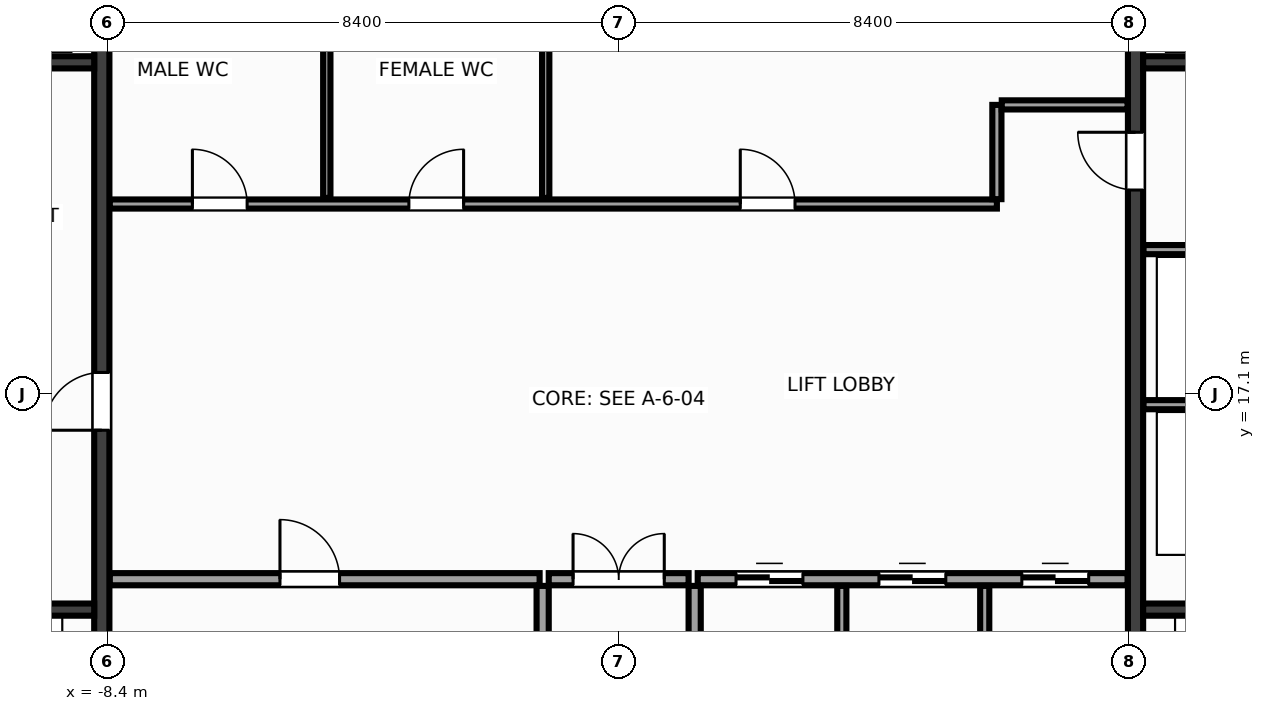
"""IFC4 building model, lengths in metres.
Left out: names, types, materials, properties, quantities, classifications, styles, units other than length and angle.
Written with IfcOpenShell. Run it as: python <this file> out.ifc"""

import sys

from ifc_helpers import new_model, si_unit, direction, frame, frame_2d, origin, place, context, subcontext, project, spatial, rectangle, extrude, source, transform, mapped, element, fill, save


model = new_model("IFC4")
c1 = context("Model", 3, precision=1e-05, world=origin(), true_north=direction((0.0, 1.0)))
c2 = subcontext(c1, "Body", "Model", "MODEL_VIEW")
j1 = project(units=[si_unit("LENGTHUNIT", "METRE"), si_unit("PLANEANGLEUNIT", "RADIAN")], contexts=[c1])
p1 = place(None, origin())
s1 = spatial("IfcSite", under=j1, at=p1, CompositionType="ELEMENT")
p2 = place(p1, origin())
s2 = spatial("IfcBuilding", under=s1, at=p2, CompositionType="ELEMENT")
p3 = place(p2, frame((0.0, 0.0, 102.8)))
s3 = spatial("IfcBuildingStorey", under=s2, at=p3, CompositionType="ELEMENT", Elevation=102.8)
m1 = source(origin(), c2, "Body", "SweptSolid", [
    extrude(rectangle(XDim=12.95, YDim=0.25, at=frame_2d((6.475, 0.0))), origin(), (0.0, 0.0, 1.0), 3.6),
])
p4 = place(p3, frame((-8.5, 10.525, 0.0), z_axis=(0.0, 0.0, 1.0), x_axis=(0.0, 1.0, 0.0)))
e1 = element("IfcWall", 1, at=p4, inside=s3, PredefinedType="SHEAR", context=c2, shape_type="MappedRepresentation", body=[
    mapped(m1, transform((0.0, 0.0, 0.0), x_axis=(1.0, 0.0, 0.0), y_axis=(0.0, 1.0, 0.0), z_axis=(0.0, 0.0, 1.0), scale=1.0)),
])
p5 = place(p4, frame((5.975, 0.0, 0.0)))
e2 = element("IfcOpeningElement", 2, at=p5, cuts=e1, PredefinedType="OPENING", context=c2, shape_type="SweptSolid", body=[
    extrude(rectangle(XDim=0.95, YDim=2.15, at=frame_2d((0.475, 1.075))), frame((0.0, 0.137, 0.0), z_axis=(0.0, -1.0, 0.0), x_axis=(1.0, 0.0, 0.0)), (0.0, 0.0, 1.0), 0.274),
])
p6 = place(p3, frame((8.5, 10.525, 0.0), z_axis=(0.0, 0.0, 1.0), x_axis=(0.0, 1.0, 0.0)))
e3 = element("IfcWall", 3, at=p6, inside=s3, PredefinedType="SHEAR", context=c2, shape_type="MappedRepresentation", body=[
    mapped(m1, transform((0.0, 0.0, 0.0), x_axis=(1.0, 0.0, 0.0), y_axis=(0.0, 1.0, 0.0), z_axis=(0.0, 0.0, 1.0), scale=1.0)),
])
p7 = place(p6, frame((9.925, 0.0, 0.0)))
e4 = element("IfcOpeningElement", 4, at=p7, cuts=e3, PredefinedType="OPENING", context=c2, shape_type="SweptSolid", body=[
    extrude(rectangle(XDim=0.95, YDim=2.15, at=frame_2d((0.475, 1.075))), frame((0.0, 0.137, 0.0), z_axis=(0.0, -1.0, 0.0), x_axis=(1.0, 0.0, 0.0)), (0.0, 0.0, 1.0), 0.274),
])
m2 = source(origin(), c2, "Body", "SweptSolid", [
    extrude(rectangle(XDim=2.825, YDim=0.2, at=frame_2d((1.413, 0.0))), origin(), (0.0, 0.0, 1.0), 3.6),
])
for number, where, z_axis, x_axis in (
    (5, (-11.45, 13.55, 0.0), (0.0, 0.0, 1.0), (1.0, 0.0, 0.0)),
    (6, (8.625, 13.55, 0.0), (0.0, 0.0, 1.0), (1.0, 0.0, 0.0)),
):
    element("IfcWall", number, at=place(p3, frame(where, z_axis=z_axis, x_axis=x_axis)), inside=s3, PredefinedType="SHEAR", context=c2, shape_type="MappedRepresentation", body=[
        mapped(m2, transform((0.0, 0.0, 0.0), x_axis=(1.0, 0.0, 0.0), y_axis=(0.0, 1.0, 0.0), z_axis=(0.0, 0.0, 1.0), scale=1.0)),
    ])
m3 = source(origin(), c2, "Body", "SweptSolid", [
    extrude(rectangle(XDim=3.02, YDim=0.2, at=frame_2d((1.51, 0.0))), origin(), (0.0, 0.0, 1.0), 3.6),
])
for number, where, z_axis, x_axis in (
    (7, (-11.645, 22.55, 0.0), (0.0, 0.0, 1.0), (1.0, 0.0, 0.0)),
    (8, (8.625, 22.55, 0.0), (0.0, 0.0, 1.0), (1.0, 0.0, 0.0)),
):
    element("IfcWall", number, at=place(p3, frame(where, z_axis=z_axis, x_axis=x_axis)), inside=s3, PredefinedType="SHEAR", context=c2, shape_type="MappedRepresentation", body=[
        mapped(m3, transform((0.0, 0.0, 0.0), x_axis=(1.0, 0.0, 0.0), y_axis=(0.0, 1.0, 0.0), z_axis=(0.0, 0.0, 1.0), scale=1.0)),
    ])
m4 = source(origin(), c2, "Body", "SweptSolid", [
    extrude(rectangle(XDim=3.01, YDim=0.15, at=frame_2d((1.505, 0.0))), origin(), (0.0, 0.0, 1.0), 3.36),
])
for number, where, z_axis, x_axis in (
    (9, (8.63, 16.92, 0.0), (0.0, 0.0, 1.0), (1.0, 0.0, 0.0)),
    (10, (8.63, 19.47, 0.0), (0.0, 0.0, 1.0), (1.0, 0.0, 0.0)),
):
    element("IfcWall", number, at=place(p3, frame(where, z_axis=z_axis, x_axis=x_axis)), inside=s3, PredefinedType="PARTITIONING", context=c2, shape_type="MappedRepresentation", body=[
        mapped(m4, transform((0.0, 0.0, 0.0), x_axis=(1.0, 0.0, 0.0), y_axis=(0.0, 1.0, 0.0), z_axis=(0.0, 0.0, 1.0), scale=1.0)),
    ])
m5 = source(origin(), c2, "Body", "SweptSolid", [
    extrude(rectangle(XDim=7.07, YDim=0.2, at=frame_2d((3.535, 0.0))), origin(), (0.0, 0.0, 1.0), 3.36),
])
p8 = place(p3, frame((-8.37, 14.05, 0.0), z_axis=(0.0, 0.0, 1.0), x_axis=(1.0, 0.0, 0.0)))
e11 = element("IfcWall", 11, at=p8, inside=s3, PredefinedType="PARTITIONING", context=c2, shape_type="MappedRepresentation", body=[
    mapped(m5, transform((0.0, 0.0, 0.0), x_axis=(1.0, 0.0, 0.0), y_axis=(0.0, 1.0, 0.0), z_axis=(0.0, 0.0, 1.0), scale=1.0)),
])
p9 = place(p8, frame((2.8, 0.0, 0.0)))
e12 = element("IfcOpeningElement", 12, at=p9, cuts=e11, PredefinedType="OPENING", context=c2, shape_type="SweptSolid", body=[
    extrude(rectangle(XDim=0.98, YDim=2.15, at=frame_2d((0.49, 1.075))), frame((0.0, 0.112, 0.0), z_axis=(0.0, -1.0, 0.0), x_axis=(1.0, 0.0, 0.0)), (0.0, 0.0, 1.0), 0.224),
])
p10 = place(p3, frame((1.3, 14.05, 0.0), z_axis=(0.0, 0.0, 1.0), x_axis=(1.0, 0.0, 0.0)))
e13 = element("IfcWall", 13, at=p10, inside=s3, PredefinedType="PARTITIONING", context=c2, shape_type="MappedRepresentation", body=[
    mapped(m5, transform((0.0, 0.0, 0.0), x_axis=(1.0, 0.0, 0.0), y_axis=(0.0, 1.0, 0.0), z_axis=(0.0, 0.0, 1.0), scale=1.0)),
])
p11 = place(p10, frame((0.63, 0.0, 0.0)))
e14 = element("IfcOpeningElement", 14, at=p11, cuts=e13, PredefinedType="OPENING", context=c2, shape_type="SweptSolid", body=[
    extrude(rectangle(XDim=1.1, YDim=2.15, at=frame_2d((0.55, 1.075))), frame((0.0, 0.112, 0.0), z_axis=(0.0, -1.0, 0.0), x_axis=(1.0, 0.0, 0.0)), (0.0, 0.0, 1.0), 0.224),
])
p12 = place(p10, frame((2.98, 0.0, 0.0)))
e15 = element("IfcOpeningElement", 15, at=p12, cuts=e13, PredefinedType="OPENING", context=c2, shape_type="SweptSolid", body=[
    extrude(rectangle(XDim=1.1, YDim=2.15, at=frame_2d((0.55, 1.075))), frame((0.0, 0.112, 0.0), z_axis=(0.0, -1.0, 0.0), x_axis=(1.0, 0.0, 0.0)), (0.0, 0.0, 1.0), 0.224),
])
p13 = place(p10, frame((5.33, 0.0, 0.0)))
e16 = element("IfcOpeningElement", 16, at=p13, cuts=e13, PredefinedType="OPENING", context=c2, shape_type="SweptSolid", body=[
    extrude(rectangle(XDim=1.1, YDim=2.15, at=frame_2d((0.55, 1.075))), frame((0.0, 0.112, 0.0), z_axis=(0.0, -1.0, 0.0), x_axis=(1.0, 0.0, 0.0)), (0.0, 0.0, 1.0), 0.224),
])
m6 = source(origin(), c2, "Body", "SweptSolid", [
    extrude(rectangle(XDim=3.415, YDim=0.2, at=frame_2d((1.708, 0.0))), origin(), (0.0, 0.0, 1.0), 3.36),
])
for number, where, z_axis, x_axis in (
    (17, (-1.25, 10.525, 0.0), (0.0, 0.0, 1.0), (0.0, 1.0, 0.0)),
    (18, (1.25, 10.525, 0.0), (0.0, 0.0, 1.0), (0.0, 1.0, 0.0)),
):
    element("IfcWall", number, at=place(p3, frame(where, z_axis=z_axis, x_axis=x_axis)), inside=s3, PredefinedType="PARTITIONING", context=c2, shape_type="MappedRepresentation", body=[
        mapped(m6, transform((0.0, 0.0, 0.0), x_axis=(1.0, 0.0, 0.0), y_axis=(0.0, 1.0, 0.0), z_axis=(0.0, 0.0, 1.0), scale=1.0)),
    ])
m7 = source(origin(), c2, "Body", "SweptSolid", [
    extrude(rectangle(XDim=2.3, YDim=0.2, at=frame_2d((1.15, 0.0))), origin(), (0.0, 0.0, 1.0), 3.36),
])
p14 = place(p3, frame((-1.15, 14.05, 0.0), z_axis=(0.0, 0.0, 1.0), x_axis=(1.0, 0.0, 0.0)))
e19 = element("IfcWall", 19, at=p14, inside=s3, PredefinedType="PARTITIONING", context=c2, shape_type="MappedRepresentation", body=[
    mapped(m7, transform((0.0, 0.0, 0.0), x_axis=(1.0, 0.0, 0.0), y_axis=(0.0, 1.0, 0.0), z_axis=(0.0, 0.0, 1.0), scale=1.0)),
])
p15 = place(p14, frame((0.4, 0.0, 0.0)))
e20 = element("IfcOpeningElement", 20, at=p15, cuts=e19, PredefinedType="OPENING", context=c2, shape_type="SweptSolid", body=[
    extrude(rectangle(XDim=1.5, YDim=2.2, at=frame_2d((0.75, 1.1))), frame((0.0, 0.112, 0.0), z_axis=(0.0, -1.0, 0.0), x_axis=(1.0, 0.0, 0.0)), (0.0, 0.0, 1.0), 0.224),
])
m8 = source(origin(), c2, "Body", "SweptSolid", [
    extrude(rectangle(XDim=14.59, YDim=0.15, at=frame_2d((7.295, 0.0))), origin(), (0.0, 0.0, 1.0), 3.36),
])
p16 = place(p3, frame((-8.37, 20.22, 0.0), z_axis=(0.0, 0.0, 1.0), x_axis=(1.0, 0.0, 0.0)))
e21 = element("IfcWall", 21, at=p16, inside=s3, PredefinedType="PARTITIONING", context=c2, shape_type="MappedRepresentation", body=[
    mapped(m8, transform((0.0, 0.0, 0.0), x_axis=(1.0, 0.0, 0.0), y_axis=(0.0, 1.0, 0.0), z_axis=(0.0, 0.0, 1.0), scale=1.0)),
])
p17 = place(p16, frame((1.36, 0.0, 0.0)))
e22 = element("IfcOpeningElement", 22, at=p17, cuts=e21, PredefinedType="OPENING", context=c2, shape_type="SweptSolid", body=[
    extrude(rectangle(XDim=0.9, YDim=2.15, at=frame_2d((0.45, 1.075))), frame((0.0, 0.087, 0.0), z_axis=(0.0, -1.0, 0.0), x_axis=(1.0, 0.0, 0.0)), (0.0, 0.0, 1.0), 0.174),
])
p18 = place(p16, frame((4.92, 0.0, 0.0)))
e23 = element("IfcOpeningElement", 23, at=p18, cuts=e21, PredefinedType="OPENING", context=c2, shape_type="SweptSolid", body=[
    extrude(rectangle(XDim=0.9, YDim=2.15, at=frame_2d((0.45, 1.075))), frame((0.0, 0.087, 0.0), z_axis=(0.0, -1.0, 0.0), x_axis=(1.0, 0.0, 0.0)), (0.0, 0.0, 1.0), 0.174),
])
p19 = place(p16, frame((10.37, 0.0, 0.0)))
e24 = element("IfcOpeningElement", 24, at=p19, cuts=e21, PredefinedType="OPENING", context=c2, shape_type="SweptSolid", body=[
    extrude(rectangle(XDim=0.9, YDim=2.15, at=frame_2d((0.45, 1.075))), frame((0.0, 0.087, 0.0), z_axis=(0.0, -1.0, 0.0), x_axis=(1.0, 0.0, 0.0)), (0.0, 0.0, 1.0), 0.174),
])
m9 = source(origin(), c2, "Body", "SweptSolid", [
    extrude(rectangle(XDim=1.55, YDim=0.15, at=frame_2d((0.775, 0.0))), origin(), (0.0, 0.0, 1.0), 3.36),
])
p20 = place(p3, frame((6.22, 20.3, 0.0), z_axis=(0.0, 0.0, 1.0), x_axis=(0.0, 1.0, 0.0)))
e25 = element("IfcWall", 25, at=p20, inside=s3, PredefinedType="PARTITIONING", context=c2, shape_type="MappedRepresentation", body=[
    mapped(m9, transform((0.0, 0.0, 0.0), x_axis=(1.0, 0.0, 0.0), y_axis=(0.0, 1.0, 0.0), z_axis=(0.0, 0.0, 1.0), scale=1.0)),
])
m10 = source(origin(), c2, "Body", "SweptSolid", [
    extrude(rectangle(XDim=2.07, YDim=0.15, at=frame_2d((1.035, 0.0))), origin(), (0.0, 0.0, 1.0), 3.36),
])
p21 = place(p3, frame((6.3, 21.85, 0.0), z_axis=(0.0, 0.0, 1.0), x_axis=(1.0, 0.0, 0.0)))
e26 = element("IfcWall", 26, at=p21, inside=s3, PredefinedType="PARTITIONING", context=c2, shape_type="MappedRepresentation", body=[
    mapped(m10, transform((0.0, 0.0, 0.0), x_axis=(1.0, 0.0, 0.0), y_axis=(0.0, 1.0, 0.0), z_axis=(0.0, 0.0, 1.0), scale=1.0)),
])
m11 = source(origin(), c2, "Body", "SweptSolid", [
    extrude(rectangle(XDim=3.415, YDim=0.15, at=frame_2d((1.708, 0.0))), origin(), (0.0, 0.0, 1.0), 3.36),
])
for number, where, z_axis, x_axis in (
    (27, (3.67, 10.525, 0.0), (0.0, 0.0, 1.0), (0.0, 1.0, 0.0)),
    (28, (6.02, 10.525, 0.0), (0.0, 0.0, 1.0), (0.0, 1.0, 0.0)),
):
    element("IfcWall", number, at=place(p3, frame(where, z_axis=z_axis, x_axis=x_axis)), inside=s3, PredefinedType="PARTITIONING", context=c2, shape_type="MappedRepresentation", body=[
        mapped(m11, transform((0.0, 0.0, 0.0), x_axis=(1.0, 0.0, 0.0), y_axis=(0.0, 1.0, 0.0), z_axis=(0.0, 0.0, 1.0), scale=1.0)),
    ])
m12 = source(origin(), c2, "Body", "SweptSolid", [
    extrude(rectangle(XDim=3.115, YDim=0.12, at=frame_2d((1.558, 0.0))), origin(), (0.0, 0.0, 1.0), 3.36),
])
for number, where, z_axis, x_axis in (
    (29, (-4.8, 20.32, 0.0), (0.0, 0.0, 1.0), (0.0, 1.0, 0.0)),
    (30, (-1.2, 20.32, 0.0), (0.0, 0.0, 1.0), (0.0, 1.0, 0.0)),
):
    element("IfcWall", number, at=place(p3, frame(where, z_axis=z_axis, x_axis=x_axis)), inside=s3, PredefinedType="PARTITIONING", context=c2, shape_type="MappedRepresentation", body=[
        mapped(m12, transform((0.0, 0.0, 0.0), x_axis=(1.0, 0.0, 0.0), y_axis=(0.0, 1.0, 0.0), z_axis=(0.0, 0.0, 1.0), scale=1.0)),
    ])
m13 = source(origin(), c2, "Body", "SweptSolid", [
    extrude(rectangle(XDim=0.95, YDim=2.15, at=frame_2d((0.475, 1.075))), frame((0.0, 0.025, 0.0), z_axis=(0.0, -1.0, 0.0), x_axis=(1.0, 0.0, 0.0)), (0.0, 0.0, 1.0), 0.05),
])
p22 = place(p5, origin())
e31 = element("IfcDoor", 31, at=p22, inside=s3, OperationType="SINGLE_SWING_LEFT", PredefinedType="DOOR", context=c2, shape_type="MappedRepresentation", body=[
    mapped(m13, transform((0.0, 0.0, 0.0), x_axis=(1.0, 0.0, 0.0), y_axis=(0.0, 1.0, 0.0), z_axis=(0.0, 0.0, 1.0), scale=1.0)),
])
fill(e2, e31)
m14 = source(origin(), c2, "Body", "SweptSolid", [
    extrude(rectangle(XDim=0.95, YDim=2.15, at=frame_2d((0.475, 1.075))), frame((0.0, 0.025, 0.0), z_axis=(0.0, -1.0, 0.0), x_axis=(1.0, 0.0, 0.0)), (0.0, 0.0, 1.0), 0.05),
])
p23 = place(p7, origin())
e32 = element("IfcDoor", 32, at=p23, inside=s3, OperationType="SINGLE_SWING_RIGHT", PredefinedType="DOOR", context=c2, shape_type="MappedRepresentation", body=[
    mapped(m14, transform((0.0, 0.0, 0.0), x_axis=(1.0, 0.0, 0.0), y_axis=(0.0, 1.0, 0.0), z_axis=(0.0, 0.0, 1.0), scale=1.0)),
])
fill(e4, e32)
m15 = source(origin(), c2, "Body", "SweptSolid", [
    extrude(rectangle(XDim=0.98, YDim=2.15, at=frame_2d((0.49, 1.075))), frame((0.0, 0.025, 0.0), z_axis=(0.0, -1.0, 0.0), x_axis=(1.0, 0.0, 0.0)), (0.0, 0.0, 1.0), 0.05),
])
p24 = place(p9, origin())
e33 = element("IfcDoor", 33, at=p24, inside=s3, OperationType="SINGLE_SWING_LEFT", PredefinedType="DOOR", context=c2, shape_type="MappedRepresentation", body=[
    mapped(m15, transform((0.0, 0.0, 0.0), x_axis=(1.0, 0.0, 0.0), y_axis=(0.0, 1.0, 0.0), z_axis=(0.0, 0.0, 1.0), scale=1.0)),
])
fill(e12, e33)
m16 = source(origin(), c2, "Body", "SweptSolid", [
    extrude(rectangle(XDim=1.1, YDim=2.15, at=frame_2d((0.55, 1.075))), frame((0.0, 0.025, 0.0), z_axis=(0.0, -1.0, 0.0), x_axis=(1.0, 0.0, 0.0)), (0.0, 0.0, 1.0), 0.05),
])
p25 = place(p11, origin())
e34 = element("IfcDoor", 34, at=p25, inside=s3, OperationType="DOUBLE_DOOR_SLIDING", PredefinedType="DOOR", context=c2, shape_type="MappedRepresentation", body=[
    mapped(m16, transform((0.0, 0.0, 0.0), x_axis=(1.0, 0.0, 0.0), y_axis=(0.0, 1.0, 0.0), z_axis=(0.0, 0.0, 1.0), scale=1.0)),
])
fill(e14, e34)
p26 = place(p12, origin())
e35 = element("IfcDoor", 35, at=p26, inside=s3, OperationType="DOUBLE_DOOR_SLIDING", PredefinedType="DOOR", context=c2, shape_type="MappedRepresentation", body=[
    mapped(m16, transform((0.0, 0.0, 0.0), x_axis=(1.0, 0.0, 0.0), y_axis=(0.0, 1.0, 0.0), z_axis=(0.0, 0.0, 1.0), scale=1.0)),
])
fill(e15, e35)
p27 = place(p13, origin())
e36 = element("IfcDoor", 36, at=p27, inside=s3, OperationType="DOUBLE_DOOR_SLIDING", PredefinedType="DOOR", context=c2, shape_type="MappedRepresentation", body=[
    mapped(m16, transform((0.0, 0.0, 0.0), x_axis=(1.0, 0.0, 0.0), y_axis=(0.0, 1.0, 0.0), z_axis=(0.0, 0.0, 1.0), scale=1.0)),
])
fill(e16, e36)
m17 = source(origin(), c2, "Body", "SweptSolid", [
    extrude(rectangle(XDim=1.5, YDim=2.2, at=frame_2d((0.75, 1.1))), frame((0.0, 0.025, 0.0), z_axis=(0.0, -1.0, 0.0), x_axis=(1.0, 0.0, 0.0)), (0.0, 0.0, 1.0), 0.05),
])
p28 = place(p15, origin())
e37 = element("IfcDoor", 37, at=p28, inside=s3, OperationType="DOUBLE_DOOR_SINGLE_SWING", PredefinedType="DOOR", context=c2, shape_type="MappedRepresentation", body=[
    mapped(m17, transform((0.0, 0.0, 0.0), x_axis=(1.0, 0.0, 0.0), y_axis=(0.0, 1.0, 0.0), z_axis=(0.0, 0.0, 1.0), scale=1.0)),
])
fill(e20, e37)
m18 = source(origin(), c2, "Body", "SweptSolid", [
    extrude(rectangle(XDim=0.9, YDim=2.15, at=frame_2d((0.45, 1.075))), frame((0.0, 0.025, 0.0), z_axis=(0.0, -1.0, 0.0), x_axis=(1.0, 0.0, 0.0)), (0.0, 0.0, 1.0), 0.05),
])
p29 = place(p17, origin())
e38 = element("IfcDoor", 38, at=p29, inside=s3, OperationType="SINGLE_SWING_LEFT", PredefinedType="DOOR", context=c2, shape_type="MappedRepresentation", body=[
    mapped(m18, transform((0.0, 0.0, 0.0), x_axis=(1.0, 0.0, 0.0), y_axis=(0.0, 1.0, 0.0), z_axis=(0.0, 0.0, 1.0), scale=1.0)),
])
fill(e22, e38)
p30 = place(p18, origin())
e39 = element("IfcDoor", 39, at=p30, inside=s3, OperationType="SINGLE_SWING_RIGHT", PredefinedType="DOOR", context=c2, shape_type="MappedRepresentation", body=[
    mapped(m18, transform((0.0, 0.0, 0.0), x_axis=(1.0, 0.0, 0.0), y_axis=(0.0, 1.0, 0.0), z_axis=(0.0, 0.0, 1.0), scale=1.0)),
])
fill(e23, e39)
p31 = place(p19, origin())
e40 = element("IfcDoor", 40, at=p31, inside=s3, OperationType="SINGLE_SWING_LEFT", PredefinedType="DOOR", context=c2, shape_type="MappedRepresentation", body=[
    mapped(m18, transform((0.0, 0.0, 0.0), x_axis=(1.0, 0.0, 0.0), y_axis=(0.0, 1.0, 0.0), z_axis=(0.0, 0.0, 1.0), scale=1.0)),
])
fill(e24, e40)
save(model, sys.argv[1])
